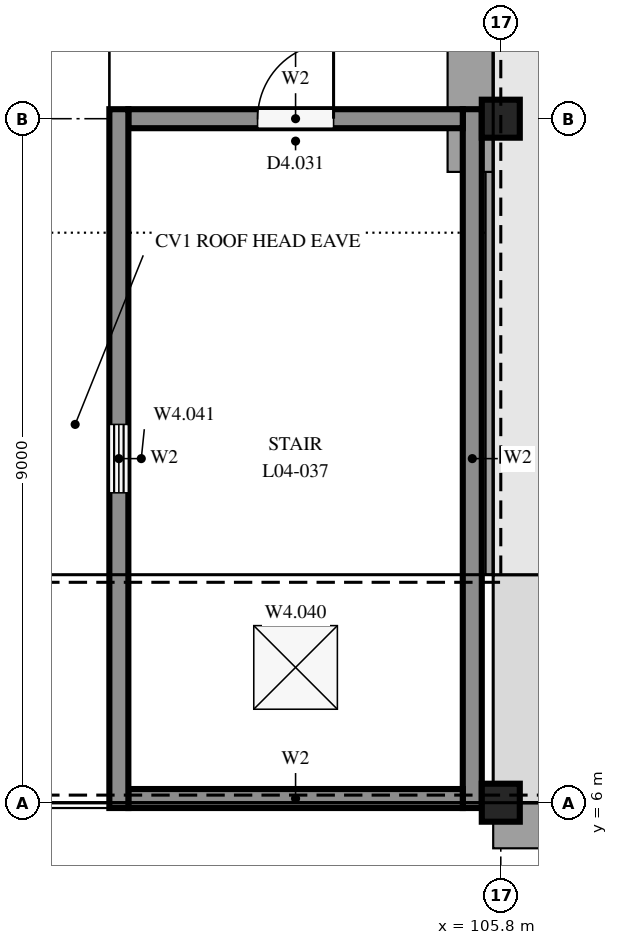
"""IFC4 building model, lengths in metres.
Left out: names, types, materials, properties, quantities, classifications, styles, units other than length and angle.
Written with IfcOpenShell. Run it as: python <this file> out.ifc"""

import sys

from ifc_helpers import new_model, si_unit, direction, frame, frame_2d, origin, origin_2d, place, context, subcontext, project, spatial, rectangle, extrude, element, fill, save


model = new_model("IFC4")
c1 = context("Model", 3, precision=1e-05, world=origin(), true_north=direction((0.0, 1.0)))
c2 = subcontext(c1, "Body", "Model", "MODEL_VIEW")
j1 = project(units=[si_unit("LENGTHUNIT", "METRE"), si_unit("PLANEANGLEUNIT", "RADIAN")], contexts=[c1])
p1 = place(None, origin())
s1 = spatial("IfcSite", under=j1, at=p1, CompositionType="ELEMENT")
p2 = place(p1, origin())
s2 = spatial("IfcBuilding", under=s1, at=p2, CompositionType="ELEMENT")
p3 = place(p2, frame((0.0, 0.0, 15.3)))
s3 = spatial("IfcBuildingStorey", under=s2, at=p3, CompositionType="ELEMENT", Elevation=15.3)
p4 = place(p3, frame((100.775, 5.93, 0.0), z_axis=(0.0, 0.0, 1.0), x_axis=(0.0, 1.0, 0.0)))
e1 = element("IfcWall", 1, at=p4, inside=s3, PredefinedType="SOLIDWALL", context=c2, shape_type="SweptSolid", body=[
    extrude(rectangle(XDim=9.195, YDim=0.25, at=frame_2d((4.598, 0.0))), origin(), (0.0, 0.0, 1.0), 2.45),
])
p5 = place(p4, frame((4.147, 0.0, 0.9)))
e2 = element("IfcOpeningElement", 2, at=p5, cuts=e1, PredefinedType="OPENING", context=c2, shape_type="SweptSolid", body=[
    extrude(rectangle(XDim=0.9, YDim=1.2, at=frame_2d((0.45, 0.6))), frame((0.0, 0.135, 0.0), z_axis=(0.0, -1.0, 0.0), x_axis=(1.0, 0.0, 0.0)), (0.0, 0.0, 1.0), 0.27),
])
p6 = place(p3, frame((105.425, 5.93, 0.0), z_axis=(0.0, 0.0, 1.0), x_axis=(0.0, 1.0, 0.0)))
e3 = element("IfcWall", 3, at=p6, inside=s3, PredefinedType="SOLIDWALL", context=c2, shape_type="SweptSolid", body=[
    extrude(rectangle(XDim=9.195, YDim=0.25, at=frame_2d((4.598, 0.0))), origin(), (0.0, 0.0, 1.0), 2.45),
])
p7 = place(p3, frame((100.9, 6.055, 0.0), z_axis=(0.0, 0.0, 1.0), x_axis=(1.0, 0.0, 0.0)))
e4 = element("IfcWall", 4, at=p7, inside=s3, PredefinedType="SOLIDWALL", context=c2, shape_type="SweptSolid", body=[
    extrude(rectangle(XDim=4.4, YDim=0.25, at=frame_2d((2.2, 0.0))), origin(), (0.0, 0.0, 1.0), 2.45),
])
p8 = place(p3, frame((100.9, 15.0, 0.0), z_axis=(0.0, 0.0, 1.0), x_axis=(1.0, 0.0, 0.0)))
e5 = element("IfcWall", 5, at=p8, inside=s3, PredefinedType="SOLIDWALL", context=c2, shape_type="SweptSolid", body=[
    extrude(rectangle(XDim=4.4, YDim=0.25, at=frame_2d((2.2, 0.0))), origin(), (0.0, 0.0, 1.0), 2.45),
])
p9 = place(p8, frame((1.7, 0.0, 0.0)))
e6 = element("IfcOpeningElement", 6, at=p9, cuts=e5, PredefinedType="OPENING", context=c2, shape_type="SweptSolid", body=[
    extrude(rectangle(XDim=1.0, YDim=2.1, at=frame_2d((0.5, 1.05))), frame((0.0, 0.135, 0.0), z_axis=(0.0, -1.0, 0.0), x_axis=(1.0, 0.0, 0.0)), (0.0, 0.0, 1.0), 0.27),
])
p10 = place(p3, frame((105.8, 6.0, 0.0), z_axis=(0.0, 0.0, 1.0), x_axis=(1.0, 0.0, 0.0)))
e7 = element("IfcColumn", 7, at=p10, inside=s3, PredefinedType="COLUMN", context=c2, shape_type="SweptSolid", body=[
    extrude(rectangle(XDim=0.5, YDim=0.5, at=origin_2d()), origin(), (0.0, 0.0, 1.0), 3.36),
])
p11 = place(p3, frame((105.8, 15.0, 0.0), z_axis=(0.0, 0.0, 1.0), x_axis=(1.0, 0.0, 0.0)))
e8 = element("IfcColumn", 8, at=p11, inside=s3, PredefinedType="COLUMN", context=c2, shape_type="SweptSolid", body=[
    extrude(rectangle(XDim=0.5, YDim=0.5, at=origin_2d()), origin(), (0.0, 0.0, 1.0), 2.41),
])
p12 = place(p3, frame((0.0, 0.0, 2.45)))
p13 = place(p12, frame((103.1, 7.78, 0.0)))
p14 = place(p13, frame((0.0, 0.0, 0.15)))
e9 = element("IfcWindow", 9, at=p14, inside=s3, PartitioningType="SINGLE_PANEL", PredefinedType="SKYLIGHT", context=c2, shape_type="SweptSolid", body=[
    extrude(rectangle(XDim=1.1, YDim=1.1, at=origin_2d()), origin(), (0.0, 0.0, 1.0), 0.05),
])
p15 = place(p9, origin())
e10 = element("IfcDoor", 10, at=p15, inside=s3, OperationType="SINGLE_SWING_RIGHT", PredefinedType="DOOR", context=c2, shape_type="SweptSolid", body=[
    extrude(rectangle(XDim=1.0, YDim=2.1, at=frame_2d((0.5, 1.05))), frame((0.0, 0.025, 0.0), z_axis=(0.0, -1.0, 0.0), x_axis=(1.0, 0.0, 0.0)), (0.0, 0.0, 1.0), 0.05),
])
fill(e6, e10)
p16 = place(p5, origin())
e11 = element("IfcWindow", 11, at=p16, inside=s3, PartitioningType="SINGLE_PANEL", PredefinedType="WINDOW", context=c2, shape_type="SweptSolid", body=[
    extrude(rectangle(XDim=0.9, YDim=1.2, at=frame_2d((0.45, 0.6))), frame((0.0, 0.03, 0.0), z_axis=(0.0, -1.0, 0.0), x_axis=(1.0, 0.0, 0.0)), (0.0, 0.0, 1.0), 0.06),
])
fill(e2, e11)
save(model, sys.argv[1])
